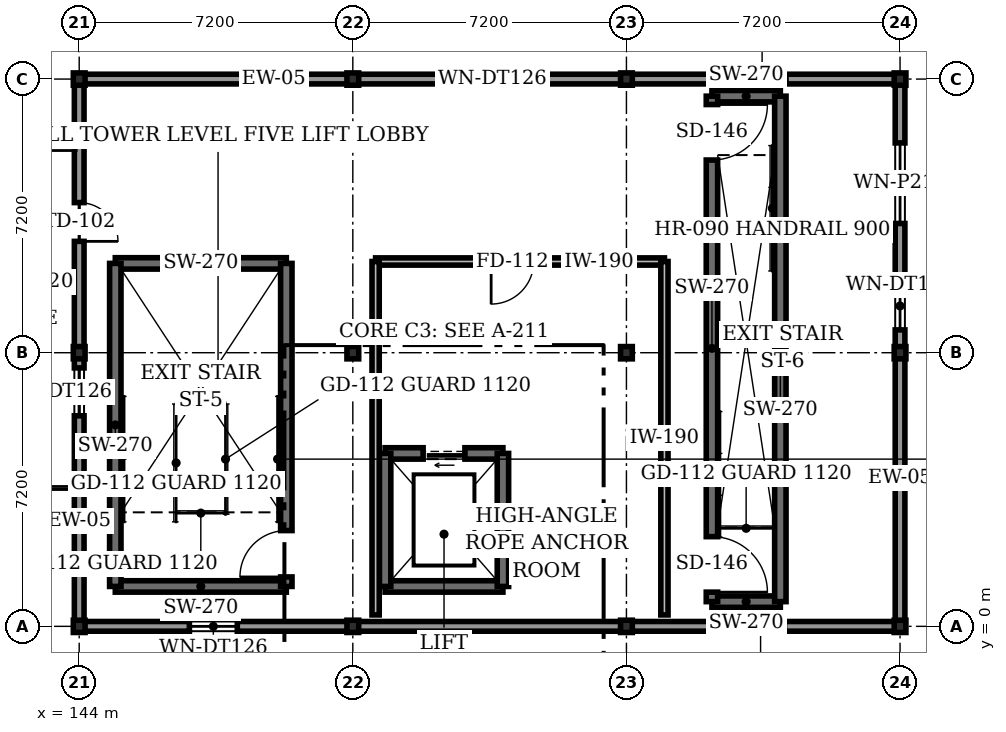
"""IFC4 building model, lengths in metres.
Left out: names, types, materials, properties, quantities, classifications, styles, units other than length and angle.
Written with IfcOpenShell. Run it as: python <this file> out.ifc"""

import sys

from ifc_helpers import new_model, si_unit, direction, frame, frame_2d, origin, origin_2d, place, context, subcontext, project, spatial, rectangle, i_section, extrude, element, fill, save


model = new_model("IFC4")
c1 = context("Model", 3, precision=1e-05, world=origin(), true_north=direction((0.0, 1.0)))
c2 = subcontext(c1, "Body", "Model", "MODEL_VIEW")
j1 = project(units=[si_unit("LENGTHUNIT", "METRE"), si_unit("PLANEANGLEUNIT", "RADIAN")], contexts=[c1])
p1 = place(None, origin())
s1 = spatial("IfcSite", under=j1, at=p1, CompositionType="ELEMENT")
p2 = place(p1, origin())
s2 = spatial("IfcBuilding", under=s1, at=p2, CompositionType="ELEMENT")
p3 = place(p2, frame((0.0, 0.0, 18.0)))
s3 = spatial("IfcBuildingStorey", under=s2, at=p3, CompositionType="ELEMENT", Elevation=18.0)
for number, where, z_axis, x_axis in (
    (1, (144.0, 0.0, 0.0), (0.0, 0.0, 1.0), (1.0, 0.0, 0.0)),
    (2, (144.0, 7.2, 0.0), (0.0, 0.0, 1.0), (1.0, 0.0, 0.0)),
    (3, (144.0, 14.4, 0.0), (0.0, 0.0, 1.0), (1.0, 0.0, 0.0)),
    (4, (151.2, 0.0, 0.0), (0.0, 0.0, 1.0), (1.0, 0.0, 0.0)),
    (5, (151.2, 7.2, 0.0), (0.0, 0.0, 1.0), (1.0, 0.0, 0.0)),
    (6, (151.2, 14.4, 0.0), (0.0, 0.0, 1.0), (1.0, 0.0, 0.0)),
    (7, (158.4, 0.0, 0.0), (0.0, 0.0, 1.0), (1.0, 0.0, 0.0)),
    (8, (158.4, 7.2, 0.0), (0.0, 0.0, 1.0), (1.0, 0.0, 0.0)),
    (9, (158.4, 14.4, 0.0), (0.0, 0.0, 1.0), (1.0, 0.0, 0.0)),
    (10, (165.6, 0.0, 0.0), (0.0, 0.0, 1.0), (1.0, 0.0, 0.0)),
    (11, (165.6, 7.2, 0.0), (0.0, 0.0, 1.0), (1.0, 0.0, 0.0)),
    (12, (165.6, 14.4, 0.0), (0.0, 0.0, 1.0), (1.0, 0.0, 0.0)),
):
    element("IfcColumn", number, at=place(p3, frame(where, z_axis=z_axis, x_axis=x_axis)), inside=s3, PredefinedType="COLUMN", context=c2, shape_type="SweptSolid", body=[
        extrude(i_section(OverallWidth=0.309, OverallDepth=0.323, WebThickness=0.014, FlangeThickness=0.023, at=origin_2d()), origin(), (0.0, 0.0, 1.0), 4.2),
    ])
p4 = place(p3, frame((165.6, 0.0, 0.0), z_axis=(0.0, 0.0, 1.0), x_axis=(-1.0, 0.0, 0.0)))
e13 = element("IfcWall", 13, at=p4, inside=s3, PredefinedType="STANDARD", context=c2, shape_type="SweptSolid", body=[
    extrude(rectangle(XDim=21.6, YDim=0.255, at=frame_2d((10.8, 0.0))), origin(), (0.0, 0.0, 1.0), 3.35),
])
p5 = place(p4, frame((17.44, 0.0, 1.15)))
e14 = element("IfcOpeningElement", 14, at=p5, cuts=e13, PredefinedType="OPENING", context=c2, shape_type="SweptSolid", body=[
    extrude(rectangle(XDim=1.26, YDim=1.38, at=frame_2d((0.63, 0.69))), frame((0.0, 0.137, 0.0), z_axis=(0.0, -1.0, 0.0), x_axis=(1.0, 0.0, 0.0)), (0.0, 0.0, 1.0), 0.275),
])
p6 = place(p4, frame((3.04, 0.0, 1.15)))
e15 = element("IfcOpeningElement", 15, at=p6, cuts=e13, PredefinedType="OPENING", context=c2, shape_type="SweptSolid", body=[
    extrude(rectangle(XDim=1.26, YDim=1.38, at=frame_2d((0.63, 0.69))), frame((0.0, 0.137, 0.0), z_axis=(0.0, -1.0, 0.0), x_axis=(1.0, 0.0, 0.0)), (0.0, 0.0, 1.0), 0.275),
])
p7 = place(p3, frame((165.6, 0.0, 0.0), z_axis=(0.0, 0.0, 1.0), x_axis=(0.0, 1.0, 0.0)))
e16 = element("IfcWall", 16, at=p7, inside=s3, PredefinedType="STANDARD", context=c2, shape_type="SweptSolid", body=[
    extrude(rectangle(XDim=14.4, YDim=0.255, at=frame_2d((7.2, 0.0))), origin(), (0.0, 0.0, 1.0), 3.35),
])
p8 = place(p7, frame((7.8, 0.0, 1.05)))
e17 = element("IfcOpeningElement", 17, at=p8, cuts=e16, PredefinedType="OPENING", context=c2, shape_type="SweptSolid", body=[
    extrude(rectangle(XDim=1.26, YDim=1.38, at=frame_2d((0.63, 0.69))), frame((0.0, 0.137, 0.0), z_axis=(0.0, -1.0, 0.0), x_axis=(1.0, 0.0, 0.0)), (0.0, 0.0, 1.0), 0.275),
])
p9 = place(p7, frame((10.6, 0.0, 1.05)))
e18 = element("IfcOpeningElement", 18, at=p9, cuts=e16, PredefinedType="OPENING", context=c2, shape_type="SweptSolid", body=[
    extrude(rectangle(XDim=2.12, YDim=1.76, at=frame_2d((1.06, 0.88))), frame((0.0, 0.137, 0.0), z_axis=(0.0, -1.0, 0.0), x_axis=(1.0, 0.0, 0.0)), (0.0, 0.0, 1.0), 0.275),
])
p10 = place(p3, frame((144.0, 14.4, 0.0), z_axis=(0.0, 0.0, 1.0), x_axis=(0.0, -1.0, 0.0)))
e19 = element("IfcWall", 19, at=p10, inside=s3, PredefinedType="STANDARD", context=c2, shape_type="SweptSolid", body=[
    extrude(rectangle(XDim=14.4, YDim=0.255, at=frame_2d((7.2, 0.0))), origin(), (0.0, 0.0, 1.0), 3.35),
])
p11 = place(p10, frame((3.25, 0.0, 0.0)))
e20 = element("IfcOpeningElement", 20, at=p11, cuts=e19, PredefinedType="OPENING", context=c2, shape_type="SweptSolid", body=[
    extrude(rectangle(XDim=1.02, YDim=2.14, at=frame_2d((0.51, 1.07))), frame((0.0, 0.137, 0.0), z_axis=(0.0, -1.0, 0.0), x_axis=(1.0, 0.0, 0.0)), (0.0, 0.0, 1.0), 0.275),
])
p12 = place(p10, frame((7.6, 0.0, 1.05)))
e21 = element("IfcOpeningElement", 21, at=p12, cuts=e19, PredefinedType="OPENING", context=c2, shape_type="SweptSolid", body=[
    extrude(rectangle(XDim=1.26, YDim=1.38, at=frame_2d((0.63, 0.69))), frame((0.0, 0.137, 0.0), z_axis=(0.0, -1.0, 0.0), x_axis=(1.0, 0.0, 0.0)), (0.0, 0.0, 1.0), 0.275),
])
p13 = place(p3, frame((165.6, 14.4, 0.0), z_axis=(0.0, 0.0, 1.0), x_axis=(-1.0, 0.0, 0.0)))
e22 = element("IfcWall", 22, at=p13, inside=s3, PredefinedType="STANDARD", context=c2, shape_type="SweptSolid", body=[
    extrude(rectangle(XDim=21.6, YDim=0.255, at=frame_2d((10.8, 0.0))), origin(), (0.0, 0.0, 1.0), 3.35),
])
p14 = place(p13, frame((3.0, 0.0, 1.15)))
e23 = element("IfcOpeningElement", 23, at=p14, cuts=e22, PredefinedType="OPENING", context=c2, shape_type="SweptSolid", body=[
    extrude(rectangle(XDim=1.26, YDim=1.38, at=frame_2d((0.63, 0.69))), frame((0.0, 0.137, 0.0), z_axis=(0.0, -1.0, 0.0), x_axis=(1.0, 0.0, 0.0)), (0.0, 0.0, 1.0), 0.275),
])
p15 = place(p13, frame((10.1, 0.0, 1.15)))
e24 = element("IfcOpeningElement", 24, at=p15, cuts=e22, PredefinedType="OPENING", context=c2, shape_type="SweptSolid", body=[
    extrude(rectangle(XDim=1.26, YDim=1.38, at=frame_2d((0.63, 0.69))), frame((0.0, 0.137, 0.0), z_axis=(0.0, -1.0, 0.0), x_axis=(1.0, 0.0, 0.0)), (0.0, 0.0, 1.0), 0.275),
])
for number, where, z_axis, x_axis in (
    (25, (144.95, 1.05, 0.0), (0.0, 0.0, 1.0), (1.0, 0.0, 0.0)),
    (26, (149.45, 9.55, 0.0), (0.0, 0.0, 1.0), (-1.0, 0.0, 0.0)),
):
    element("IfcWall", number, at=place(p3, frame(where, z_axis=z_axis, x_axis=x_axis)), inside=s3, PredefinedType="SHEAR", context=c2, shape_type="SweptSolid", body=[
        extrude(rectangle(XDim=4.5, YDim=0.3, at=frame_2d((2.25, 0.0))), origin(), (0.0, 0.0, 1.0), 3.975),
    ])
p16 = place(p3, frame((144.95, 9.55, 0.0), z_axis=(0.0, 0.0, 1.0), x_axis=(0.0, -1.0, 0.0)))
e27 = element("IfcWall", 27, at=p16, inside=s3, PredefinedType="SHEAR", context=c2, shape_type="SweptSolid", body=[
    extrude(rectangle(XDim=8.5, YDim=0.3, at=frame_2d((4.25, 0.0))), origin(), (0.0, 0.0, 1.0), 3.975),
])
p17 = place(p3, frame((149.45, 1.05, 0.0), z_axis=(0.0, 0.0, 1.0), x_axis=(0.0, 1.0, 0.0)))
e28 = element("IfcWall", 28, at=p17, inside=s3, PredefinedType="SHEAR", context=c2, shape_type="SweptSolid", body=[
    extrude(rectangle(XDim=8.5, YDim=0.3, at=frame_2d((4.25, 0.0))), origin(), (0.0, 0.0, 1.0), 3.975),
])
p18 = place(p17, frame((0.25, 0.0, 0.0)))
e29 = element("IfcOpeningElement", 29, at=p18, cuts=e28, PredefinedType="OPENING", context=c2, shape_type="SweptSolid", body=[
    extrude(rectangle(XDim=1.22, YDim=2.16, at=frame_2d((0.61, 1.08))), frame((0.0, 0.16, 0.0), z_axis=(0.0, -1.0, 0.0), x_axis=(1.0, 0.0, 0.0)), (0.0, 0.0, 1.0), 0.32),
])
p19 = place(p3, frame((152.05, 1.05, 0.0), z_axis=(0.0, 0.0, 1.0), x_axis=(1.0, 0.0, 0.0)))
e30 = element("IfcWall", 30, at=p19, inside=s3, PredefinedType="SHEAR", context=c2, shape_type="SweptSolid", body=[
    extrude(rectangle(XDim=3.1, YDim=0.3, at=frame_2d((1.55, 0.0))), origin(), (0.0, 0.0, 1.0), 3.975),
])
p20 = place(p3, frame((155.15, 4.55, 0.0), z_axis=(0.0, 0.0, 1.0), x_axis=(-1.0, 0.0, 0.0)))
e31 = element("IfcWall", 31, at=p20, inside=s3, PredefinedType="SHEAR", context=c2, shape_type="SweptSolid", body=[
    extrude(rectangle(XDim=3.1, YDim=0.3, at=frame_2d((1.55, 0.0))), origin(), (0.0, 0.0, 1.0), 3.975),
])
p21 = place(p20, frame((1.0, 0.0, 0.0)))
e32 = element("IfcOpeningElement", 32, at=p21, cuts=e31, PredefinedType="OPENING", context=c2, shape_type="SweptSolid", body=[
    extrude(rectangle(XDim=1.1, YDim=2.22, at=frame_2d((0.55, 1.11))), frame((0.0, 0.16, 0.0), z_axis=(0.0, -1.0, 0.0), x_axis=(1.0, 0.0, 0.0)), (0.0, 0.0, 1.0), 0.32),
])
for number, where, z_axis, x_axis in (
    (33, (152.05, 4.55, 0.0), (0.0, 0.0, 1.0), (0.0, -1.0, 0.0)),
    (34, (155.15, 1.05, 0.0), (0.0, 0.0, 1.0), (0.0, 1.0, 0.0)),
):
    element("IfcWall", number, at=place(p3, frame(where, z_axis=z_axis, x_axis=x_axis)), inside=s3, PredefinedType="SHEAR", context=c2, shape_type="SweptSolid", body=[
        extrude(rectangle(XDim=3.5, YDim=0.3, at=frame_2d((1.75, 0.0))), origin(), (0.0, 0.0, 1.0), 3.975),
    ])
for number, where, z_axis, x_axis in (
    (35, (160.65, 0.65, 0.0), (0.0, 0.0, 1.0), (1.0, 0.0, 0.0)),
    (36, (162.45, 13.95, 0.0), (0.0, 0.0, 1.0), (-1.0, 0.0, 0.0)),
):
    element("IfcWall", number, at=place(p3, frame(where, z_axis=z_axis, x_axis=x_axis)), inside=s3, PredefinedType="SHEAR", context=c2, shape_type="SweptSolid", body=[
        extrude(rectangle(XDim=1.8, YDim=0.3, at=frame_2d((0.9, 0.0))), origin(), (0.0, 0.0, 1.0), 3.975),
    ])
p22 = place(p3, frame((160.65, 13.95, 0.0), z_axis=(0.0, 0.0, 1.0), x_axis=(0.0, -1.0, 0.0)))
e37 = element("IfcWall", 37, at=p22, inside=s3, PredefinedType="SHEAR", context=c2, shape_type="SweptSolid", body=[
    extrude(rectangle(XDim=13.3, YDim=0.3, at=frame_2d((6.65, 0.0))), origin(), (0.0, 0.0, 1.0), 3.975),
])
p23 = place(p22, frame((11.59, 0.0, 0.0)))
e38 = element("IfcOpeningElement", 38, at=p23, cuts=e37, PredefinedType="OPENING", context=c2, shape_type="SweptSolid", body=[
    extrude(rectangle(XDim=1.46, YDim=2.24, at=frame_2d((0.73, 1.12))), frame((0.0, 0.16, 0.0), z_axis=(0.0, -1.0, 0.0), x_axis=(1.0, 0.0, 0.0)), (0.0, 0.0, 1.0), 0.32),
])
p24 = place(p22, frame((0.22, 0.0, 0.0)))
e39 = element("IfcOpeningElement", 39, at=p24, cuts=e37, PredefinedType="OPENING", context=c2, shape_type="SweptSolid", body=[
    extrude(rectangle(XDim=1.46, YDim=2.24, at=frame_2d((0.73, 1.12))), frame((0.0, 0.16, 0.0), z_axis=(0.0, -1.0, 0.0), x_axis=(1.0, 0.0, 0.0)), (0.0, 0.0, 1.0), 0.32),
])
p25 = place(p3, frame((162.45, 0.65, 0.0), z_axis=(0.0, 0.0, 1.0), x_axis=(0.0, 1.0, 0.0)))
e40 = element("IfcWall", 40, at=p25, inside=s3, PredefinedType="SHEAR", context=c2, shape_type="SweptSolid", body=[
    extrude(rectangle(XDim=13.3, YDim=0.3, at=frame_2d((6.65, 0.0))), origin(), (0.0, 0.0, 1.0), 3.975),
])
p26 = place(p3, frame((159.4, 9.6, 0.0), z_axis=(0.0, 0.0, 1.0), x_axis=(-1.0, 0.0, 0.0)))
e41 = element("IfcWall", 41, at=p26, inside=s3, PredefinedType="STANDARD", context=c2, shape_type="SweptSolid", body=[
    extrude(rectangle(XDim=7.6, YDim=0.19, at=frame_2d((3.8, 0.0))), origin(), (0.0, 0.0, 1.0), 3.442),
])
p27 = place(p26, frame((3.44, 0.0, 0.0)))
e42 = element("IfcOpeningElement", 42, at=p27, cuts=e41, PredefinedType="OPENING", context=c2, shape_type="SweptSolid", body=[
    extrude(rectangle(XDim=1.12, YDim=2.16, at=frame_2d((0.56, 1.08))), frame((0.0, 0.105, 0.0), z_axis=(0.0, -1.0, 0.0), x_axis=(1.0, 0.0, 0.0)), (0.0, 0.0, 1.0), 0.21),
])
p28 = place(p3, frame((151.8, 9.6, 0.0), z_axis=(0.0, 0.0, 1.0), x_axis=(0.0, -1.0, 0.0)))
e43 = element("IfcWall", 43, at=p28, inside=s3, PredefinedType="STANDARD", context=c2, shape_type="SweptSolid", body=[
    extrude(rectangle(XDim=9.3, YDim=0.19, at=frame_2d((4.65, 0.0))), origin(), (0.0, 0.0, 1.0), 3.442),
])
p29 = place(p3, frame((159.4, 0.3, 0.0), z_axis=(0.0, 0.0, 1.0), x_axis=(0.0, 1.0, 0.0)))
e44 = element("IfcWall", 44, at=p29, inside=s3, PredefinedType="STANDARD", context=c2, shape_type="SweptSolid", body=[
    extrude(rectangle(XDim=9.3, YDim=0.19, at=frame_2d((4.65, 0.0))), origin(), (0.0, 0.0, 1.0), 3.975),
])
p30 = place(p5, origin())
e45 = element("IfcWindow", 45, at=p30, inside=s3, PartitioningType="SINGLE_PANEL", PredefinedType="WINDOW", context=c2, shape_type="SweptSolid", body=[
    extrude(rectangle(XDim=1.26, YDim=1.38, at=frame_2d((0.63, 0.69))), frame((0.0, 0.03, 0.0), z_axis=(0.0, -1.0, 0.0), x_axis=(1.0, 0.0, 0.0)), (0.0, 0.0, 1.0), 0.06),
])
fill(e14, e45)
p31 = place(p6, origin())
e46 = element("IfcWindow", 46, at=p31, inside=s3, PartitioningType="SINGLE_PANEL", PredefinedType="WINDOW", context=c2, shape_type="SweptSolid", body=[
    extrude(rectangle(XDim=1.26, YDim=1.38, at=frame_2d((0.63, 0.69))), frame((0.0, 0.03, 0.0), z_axis=(0.0, -1.0, 0.0), x_axis=(1.0, 0.0, 0.0)), (0.0, 0.0, 1.0), 0.06),
])
fill(e15, e46)
p32 = place(p8, origin())
e47 = element("IfcWindow", 47, at=p32, inside=s3, PartitioningType="SINGLE_PANEL", PredefinedType="WINDOW", context=c2, shape_type="SweptSolid", body=[
    extrude(rectangle(XDim=1.26, YDim=1.38, at=frame_2d((0.63, 0.69))), frame((0.0, 0.03, 0.0), z_axis=(0.0, -1.0, 0.0), x_axis=(1.0, 0.0, 0.0)), (0.0, 0.0, 1.0), 0.06),
])
fill(e17, e47)
p33 = place(p9, origin())
e48 = element("IfcWindow", 48, at=p33, inside=s3, PartitioningType="SINGLE_PANEL", PredefinedType="WINDOW", context=c2, shape_type="SweptSolid", body=[
    extrude(rectangle(XDim=2.12, YDim=1.76, at=frame_2d((1.06, 0.88))), frame((0.0, 0.03, 0.0), z_axis=(0.0, -1.0, 0.0), x_axis=(1.0, 0.0, 0.0)), (0.0, 0.0, 1.0), 0.06),
])
fill(e18, e48)
p34 = place(p11, origin())
e49 = element("IfcDoor", 49, at=p34, inside=s3, OperationType="SINGLE_SWING_RIGHT", PredefinedType="DOOR", context=c2, shape_type="SweptSolid", body=[
    extrude(rectangle(XDim=1.02, YDim=2.14, at=frame_2d((0.51, 1.07))), frame((0.0, 0.025, 0.0), z_axis=(0.0, -1.0, 0.0), x_axis=(1.0, 0.0, 0.0)), (0.0, 0.0, 1.0), 0.05),
])
fill(e20, e49)
p35 = place(p12, origin())
e50 = element("IfcWindow", 50, at=p35, inside=s3, PartitioningType="SINGLE_PANEL", PredefinedType="WINDOW", context=c2, shape_type="SweptSolid", body=[
    extrude(rectangle(XDim=1.26, YDim=1.38, at=frame_2d((0.63, 0.69))), frame((0.0, 0.03, 0.0), z_axis=(0.0, -1.0, 0.0), x_axis=(1.0, 0.0, 0.0)), (0.0, 0.0, 1.0), 0.06),
])
fill(e21, e50)
p36 = place(p14, origin())
e51 = element("IfcWindow", 51, at=p36, inside=s3, PartitioningType="SINGLE_PANEL", PredefinedType="WINDOW", context=c2, shape_type="SweptSolid", body=[
    extrude(rectangle(XDim=1.26, YDim=1.38, at=frame_2d((0.63, 0.69))), frame((0.0, 0.03, 0.0), z_axis=(0.0, -1.0, 0.0), x_axis=(1.0, 0.0, 0.0)), (0.0, 0.0, 1.0), 0.06),
])
fill(e23, e51)
p37 = place(p15, origin())
e52 = element("IfcWindow", 52, at=p37, inside=s3, PartitioningType="SINGLE_PANEL", PredefinedType="WINDOW", context=c2, shape_type="SweptSolid", body=[
    extrude(rectangle(XDim=1.26, YDim=1.38, at=frame_2d((0.63, 0.69))), frame((0.0, 0.03, 0.0), z_axis=(0.0, -1.0, 0.0), x_axis=(1.0, 0.0, 0.0)), (0.0, 0.0, 1.0), 0.06),
])
fill(e24, e52)
p38 = place(p18, origin())
e53 = element("IfcDoor", 53, at=p38, inside=s3, OperationType="SINGLE_SWING_LEFT", PredefinedType="DOOR", context=c2, shape_type="SweptSolid", body=[
    extrude(rectangle(XDim=1.22, YDim=2.16, at=frame_2d((0.61, 1.08))), frame((0.0, 0.025, 0.0), z_axis=(0.0, -1.0, 0.0), x_axis=(1.0, 0.0, 0.0)), (0.0, 0.0, 1.0), 0.05),
])
fill(e29, e53)
p39 = place(p21, origin())
e54 = element("IfcDoor", 54, at=p39, inside=s3, OperationType="SLIDING_TO_LEFT", PredefinedType="DOOR", context=c2, shape_type="SweptSolid", body=[
    extrude(rectangle(XDim=1.1, YDim=2.22, at=frame_2d((0.55, 1.11))), frame((0.0, 0.025, 0.0), z_axis=(0.0, -1.0, 0.0), x_axis=(1.0, 0.0, 0.0)), (0.0, 0.0, 1.0), 0.05),
])
fill(e32, e54)
p40 = place(p23, origin())
e55 = element("IfcDoor", 55, at=p40, inside=s3, OperationType="SINGLE_SWING_RIGHT", PredefinedType="DOOR", context=c2, shape_type="SweptSolid", body=[
    extrude(rectangle(XDim=1.46, YDim=2.24, at=frame_2d((0.73, 1.12))), frame((0.0, 0.025, 0.0), z_axis=(0.0, -1.0, 0.0), x_axis=(1.0, 0.0, 0.0)), (0.0, 0.0, 1.0), 0.05),
])
fill(e38, e55)
p41 = place(p24, origin())
e56 = element("IfcDoor", 56, at=p41, inside=s3, OperationType="SINGLE_SWING_LEFT", PredefinedType="DOOR", context=c2, shape_type="SweptSolid", body=[
    extrude(rectangle(XDim=1.46, YDim=2.24, at=frame_2d((0.73, 1.12))), frame((0.0, 0.025, 0.0), z_axis=(0.0, -1.0, 0.0), x_axis=(1.0, 0.0, 0.0)), (0.0, 0.0, 1.0), 0.05),
])
fill(e39, e56)
p42 = place(p27, origin())
e57 = element("IfcDoor", 57, at=p42, inside=s3, OperationType="SINGLE_SWING_RIGHT", PredefinedType="DOOR", context=c2, shape_type="SweptSolid", body=[
    extrude(rectangle(XDim=1.12, YDim=2.16, at=frame_2d((0.56, 1.08))), frame((0.0, 0.025, 0.0), z_axis=(0.0, -1.0, 0.0), x_axis=(1.0, 0.0, 0.0)), (0.0, 0.0, 1.0), 0.05),
])
fill(e42, e57)
save(model, sys.argv[1])
